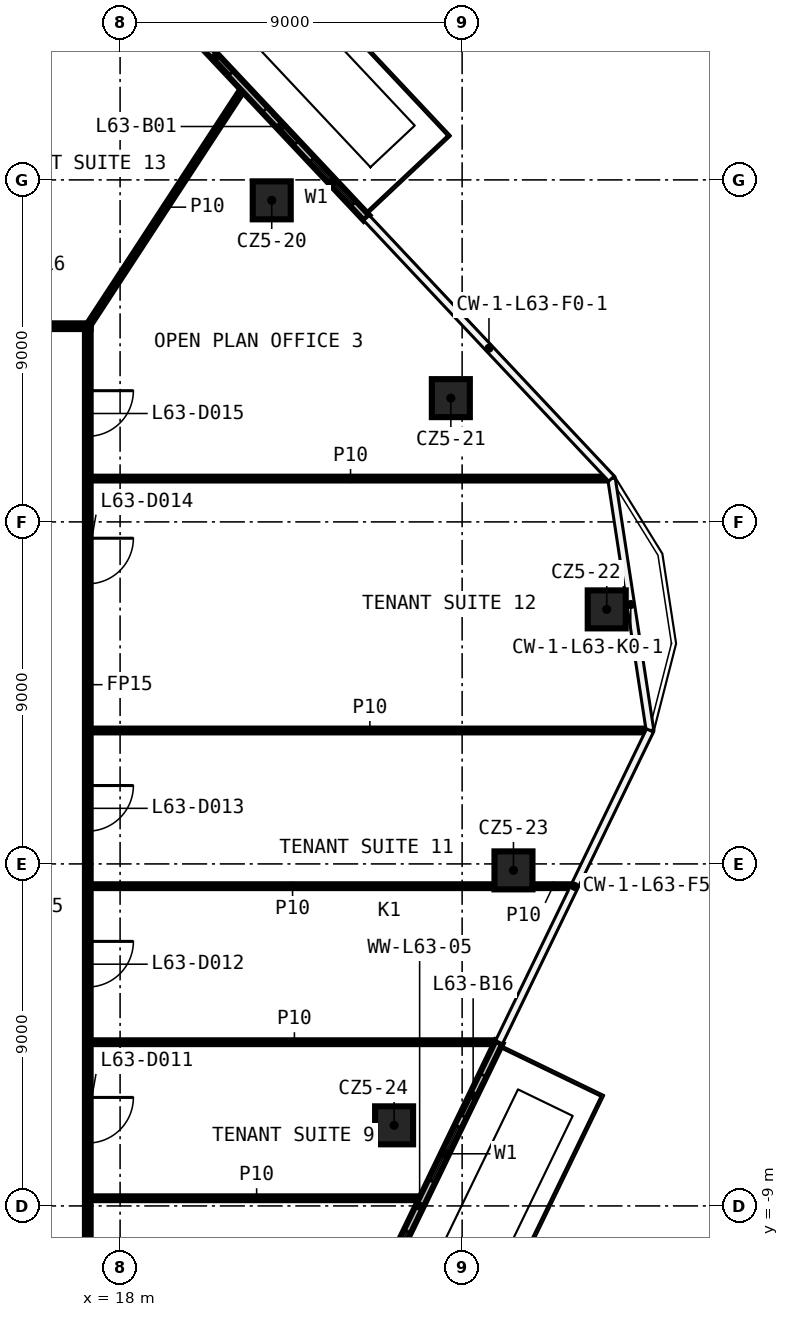
"""IFC4 building model, lengths in metres.
Left out: names, types, materials, properties, quantities, classifications, styles, units other than length and angle.
Written with IfcOpenShell. Run it as: python <this file> out.ifc"""

import sys

from ifc_helpers import new_model, si_unit, direction, frame, frame_2d, origin, origin_2d, place, context, subcontext, project, spatial, rectangle, extrude, element, fill, save


model = new_model("IFC4")
c1 = context("Model", 3, precision=1e-05, world=origin(), true_north=direction((0.0, 1.0)))
c2 = subcontext(c1, "Body", "Model", "MODEL_VIEW")
j1 = project(units=[si_unit("LENGTHUNIT", "METRE"), si_unit("PLANEANGLEUNIT", "RADIAN")], contexts=[c1])
p1 = place(None, origin())
s1 = spatial("IfcSite", under=j1, at=p1, CompositionType="ELEMENT")
p2 = place(p1, origin())
s2 = spatial("IfcBuilding", under=s1, at=p2, CompositionType="ELEMENT")
p3 = place(p2, frame((0.0, 0.0, 298.4)))
s3 = spatial("IfcBuildingStorey", under=s2, at=p3, CompositionType="ELEMENT", Elevation=298.4)
for number, where, z_axis, x_axis in (
    (1, (21.99, 17.462, 0.0), (0.0, 0.0, 1.0), (1.0, 0.0, 0.0)),
    (2, (26.703, 12.257, 0.0), (0.0, 0.0, 1.0), (1.0, 0.0, 0.0)),
    (3, (30.805, 6.698, 0.0), (0.0, 0.0, 1.0), (1.0, 0.0, 0.0)),
    (4, (28.351, -0.17, 0.0), (0.0, 0.0, 1.0), (1.0, 0.0, 0.0)),
    (5, (25.21, -6.879, 0.0), (0.0, 0.0, 1.0), (1.0, 0.0, 0.0)),
):
    element("IfcColumn", number, at=place(p3, frame(where, z_axis=z_axis, x_axis=x_axis)), inside=s3, PredefinedType="COLUMN", context=c2, shape_type="SweptSolid", body=[
        extrude(rectangle(XDim=1.0, YDim=1.0, at=origin_2d()), origin(), (0.0, 0.0, 1.0), 3.82),
    ])
p4 = place(p3, frame((17.225, -8.798, 0.0), z_axis=(0.0, 0.0, 1.0), x_axis=(1.0, 0.0, 0.0)))
e6 = element("IfcWall", 6, at=p4, inside=s3, PredefinedType="PARTITIONING", context=c2, shape_type="SweptSolid", body=[
    extrude(rectangle(XDim=8.735, YDim=0.1, at=frame_2d((4.368, 0.0))), origin(), (0.0, 0.0, 1.0), 3.82),
])
p5 = place(p3, frame((17.225, -4.692, 0.0), z_axis=(0.0, 0.0, 1.0), x_axis=(1.0, 0.0, 0.0)))
e7 = element("IfcWall", 7, at=p5, inside=s3, PredefinedType="PARTITIONING", context=c2, shape_type="SweptSolid", body=[
    extrude(rectangle(XDim=10.723, YDim=0.1, at=frame_2d((5.362, 0.0))), origin(), (0.0, 0.0, 1.0), 3.82),
])
p6 = place(p3, frame((17.225, -0.586, 0.0), z_axis=(0.0, 0.0, 1.0), x_axis=(1.0, 0.0, 0.0)))
e8 = element("IfcWall", 8, at=p6, inside=s3, PredefinedType="PARTITIONING", context=c2, shape_type="SweptSolid", body=[
    extrude(rectangle(XDim=10.626, YDim=0.1, at=frame_2d((5.313, 0.0))), origin(), (0.0, 0.0, 1.0), 3.82),
])
p7 = place(p3, frame((28.851, -0.586, 0.0), z_axis=(0.0, 0.0, 1.0), x_axis=(1.0, 0.0, 0.0)))
e9 = element("IfcWall", 9, at=p7, inside=s3, PredefinedType="PARTITIONING", context=c2, shape_type="SweptSolid", body=[
    extrude(rectangle(XDim=1.086, YDim=0.1, at=frame_2d((0.543, 0.0))), origin(), (0.0, 0.0, 1.0), 3.82),
])
p8 = place(p3, frame((17.225, 3.511, 0.0), z_axis=(0.0, 0.0, 1.0), x_axis=(1.0, 0.0, 0.0)))
e10 = element("IfcWall", 10, at=p8, inside=s3, PredefinedType="PARTITIONING", context=c2, shape_type="SweptSolid", body=[
    extrude(rectangle(XDim=14.696, YDim=0.1, at=frame_2d((7.348, 0.0))), origin(), (0.0, 0.0, 1.0), 3.82),
])
p9 = place(p3, frame((17.225, 10.14, 0.0), z_axis=(0.0, 0.0, 1.0), x_axis=(1.0, 0.0, 0.0)))
e11 = element("IfcWall", 11, at=p9, inside=s3, PredefinedType="PARTITIONING", context=c2, shape_type="SweptSolid", body=[
    extrude(rectangle(XDim=13.677, YDim=0.1, at=frame_2d((6.839, 0.0))), origin(), (0.0, 0.0, 1.0), 3.82),
])
p10 = place(p3, frame((-17.225, 14.15, 0.0), z_axis=(0.0, 0.0, 1.0), x_axis=(1.0, 0.0, 0.0)))
e12 = element("IfcWall", 12, at=p10, inside=s3, PredefinedType="PARTITIONING", context=c2, shape_type="SweptSolid", body=[
    extrude(rectangle(XDim=34.45, YDim=0.15, at=frame_2d((17.225, 0.0))), origin(), (0.0, 0.0, 1.0), 3.82),
])
p11 = place(p10, frame((31.962, 0.0, 0.0)))
e13 = element("IfcOpeningElement", 13, at=p11, cuts=e12, PredefinedType="OPENING", context=c2, shape_type="SweptSolid", body=[
    extrude(rectangle(XDim=1.2, YDim=2.1, at=frame_2d((0.6, 1.05))), frame((0.0, 0.085, 0.0), z_axis=(0.0, -1.0, 0.0), x_axis=(1.0, 0.0, 0.0)), (0.0, 0.0, 1.0), 0.17),
])
p12 = place(p10, frame((26.254, 0.0, 0.0)))
e14 = element("IfcOpeningElement", 14, at=p12, cuts=e12, PredefinedType="OPENING", context=c2, shape_type="SweptSolid", body=[
    extrude(rectangle(XDim=1.2, YDim=2.1, at=frame_2d((0.6, 1.05))), frame((0.0, 0.085, 0.0), z_axis=(0.0, -1.0, 0.0), x_axis=(1.0, 0.0, 0.0)), (0.0, 0.0, 1.0), 0.17),
])
p13 = place(p10, frame((20.032, 0.0, 0.0)))
e15 = element("IfcOpeningElement", 15, at=p13, cuts=e12, PredefinedType="OPENING", context=c2, shape_type="SweptSolid", body=[
    extrude(rectangle(XDim=1.2, YDim=2.1, at=frame_2d((0.6, 1.05))), frame((0.0, 0.085, 0.0), z_axis=(0.0, -1.0, 0.0), x_axis=(1.0, 0.0, 0.0)), (0.0, 0.0, 1.0), 0.17),
])
p14 = place(p10, frame((15.378, 0.0, 0.0)))
e16 = element("IfcOpeningElement", 16, at=p14, cuts=e12, PredefinedType="OPENING", context=c2, shape_type="SweptSolid", body=[
    extrude(rectangle(XDim=1.2, YDim=2.1, at=frame_2d((0.6, 1.05))), frame((0.0, 0.085, 0.0), z_axis=(0.0, -1.0, 0.0), x_axis=(1.0, 0.0, 0.0)), (0.0, 0.0, 1.0), 0.17),
])
p15 = place(p10, frame((10.723, 0.0, 0.0)))
e17 = element("IfcOpeningElement", 17, at=p15, cuts=e12, PredefinedType="OPENING", context=c2, shape_type="SweptSolid", body=[
    extrude(rectangle(XDim=1.2, YDim=2.1, at=frame_2d((0.6, 1.05))), frame((0.0, 0.085, 0.0), z_axis=(0.0, -1.0, 0.0), x_axis=(1.0, 0.0, 0.0)), (0.0, 0.0, 1.0), 0.17),
])
p16 = place(p10, frame((6.073, 0.0, 0.0)))
e18 = element("IfcOpeningElement", 18, at=p16, cuts=e12, PredefinedType="OPENING", context=c2, shape_type="SweptSolid", body=[
    extrude(rectangle(XDim=1.2, YDim=2.1, at=frame_2d((0.6, 1.05))), frame((0.0, 0.085, 0.0), z_axis=(0.0, -1.0, 0.0), x_axis=(1.0, 0.0, 0.0)), (0.0, 0.0, 1.0), 0.17),
])
p17 = place(p10, frame((1.774, 0.0, 0.0)))
e19 = element("IfcOpeningElement", 19, at=p17, cuts=e12, PredefinedType="OPENING", context=c2, shape_type="SweptSolid", body=[
    extrude(rectangle(XDim=1.2, YDim=2.1, at=frame_2d((0.6, 1.05))), frame((0.0, 0.085, 0.0), z_axis=(0.0, -1.0, 0.0), x_axis=(1.0, 0.0, 0.0)), (0.0, 0.0, 1.0), 0.17),
])
p18 = place(p3, frame((17.15, 14.15, 0.0), z_axis=(0.0, 0.0, 1.0), x_axis=(0.547120172247, 0.837054070608, 0.0)))
e20 = element("IfcWall", 20, at=p18, inside=s3, PredefinedType="PARTITIONING", context=c2, shape_type="SweptSolid", body=[
    extrude(rectangle(XDim=7.485, YDim=0.1, at=frame_2d((3.743, 0.0))), origin(), (0.0, 0.0, 1.0), 3.82),
])
p19 = place(p3, frame((17.15, 14.075, 0.0), z_axis=(0.0, 0.0, 1.0), x_axis=(0.0, -1.0, 0.0)))
e21 = element("IfcWall", 21, at=p19, inside=s3, PredefinedType="PARTITIONING", context=c2, shape_type="SweptSolid", body=[
    extrude(rectangle(XDim=28.15, YDim=0.15, at=frame_2d((14.075, 0.0))), origin(), (0.0, 0.0, 1.0), 3.82),
])
p20 = place(p19, frame((24.326, 0.0, 0.0)))
e22 = element("IfcOpeningElement", 22, at=p20, cuts=e21, PredefinedType="OPENING", context=c2, shape_type="SweptSolid", body=[
    extrude(rectangle(XDim=1.2, YDim=2.1, at=frame_2d((0.6, 1.05))), frame((0.0, 0.085, 0.0), z_axis=(0.0, -1.0, 0.0), x_axis=(1.0, 0.0, 0.0)), (0.0, 0.0, 1.0), 0.17),
])
p21 = place(p19, frame((20.22, 0.0, 0.0)))
e23 = element("IfcOpeningElement", 23, at=p21, cuts=e21, PredefinedType="OPENING", context=c2, shape_type="SweptSolid", body=[
    extrude(rectangle(XDim=1.2, YDim=2.1, at=frame_2d((0.6, 1.05))), frame((0.0, 0.085, 0.0), z_axis=(0.0, -1.0, 0.0), x_axis=(1.0, 0.0, 0.0)), (0.0, 0.0, 1.0), 0.17),
])
p22 = place(p19, frame((16.114, 0.0, 0.0)))
e24 = element("IfcOpeningElement", 24, at=p22, cuts=e21, PredefinedType="OPENING", context=c2, shape_type="SweptSolid", body=[
    extrude(rectangle(XDim=1.2, YDim=2.1, at=frame_2d((0.6, 1.05))), frame((0.0, 0.085, 0.0), z_axis=(0.0, -1.0, 0.0), x_axis=(1.0, 0.0, 0.0)), (0.0, 0.0, 1.0), 0.17),
])
p23 = place(p19, frame((12.012, 0.0, 0.0)))
e25 = element("IfcOpeningElement", 25, at=p23, cuts=e21, PredefinedType="OPENING", context=c2, shape_type="SweptSolid", body=[
    extrude(rectangle(XDim=1.2, YDim=2.1, at=frame_2d((0.6, 1.05))), frame((0.0, 0.085, 0.0), z_axis=(0.0, -1.0, 0.0), x_axis=(1.0, 0.0, 0.0)), (0.0, 0.0, 1.0), 0.17),
])
p24 = place(p19, frame((5.504, 0.0, 0.0)))
e26 = element("IfcOpeningElement", 26, at=p24, cuts=e21, PredefinedType="OPENING", context=c2, shape_type="SweptSolid", body=[
    extrude(rectangle(XDim=1.2, YDim=2.1, at=frame_2d((0.6, 1.05))), frame((0.0, 0.085, 0.0), z_axis=(0.0, -1.0, 0.0), x_axis=(1.0, 0.0, 0.0)), (0.0, 0.0, 1.0), 0.17),
])
p25 = place(p19, frame((1.622, 0.0, 0.0)))
e27 = element("IfcOpeningElement", 27, at=p25, cuts=e21, PredefinedType="OPENING", context=c2, shape_type="SweptSolid", body=[
    extrude(rectangle(XDim=1.2, YDim=2.1, at=frame_2d((0.6, 1.05))), frame((0.0, 0.085, 0.0), z_axis=(0.0, -1.0, 0.0), x_axis=(1.0, 0.0, 0.0)), (0.0, 0.0, 1.0), 0.17),
])
p26 = place(p3, frame((24.482, 17.0, 0.0), z_axis=(0.0, 0.0, 1.0), x_axis=(-0.684823965592, 0.728708539919, 0.0)))
e28 = element("IfcWall", 28, at=p26, inside=s3, PredefinedType="SOLIDWALL", context=c2, shape_type="SweptSolid", body=[
    extrude(rectangle(XDim=14.131, YDim=0.2, at=frame_2d((7.065, 0.0))), origin(), (0.0, 0.0, 1.0), 3.82),
])
p27 = place(p26, frame((0.5, 0.0, 0.6)))
e29 = element("IfcOpeningElement", 29, at=p27, cuts=e28, PredefinedType="OPENING", context=c2, shape_type="SweptSolid", body=[
    extrude(rectangle(XDim=1.6, YDim=2.4, at=frame_2d((0.8, 1.2))), frame((0.0, 0.11, 0.0), z_axis=(0.0, -1.0, 0.0), x_axis=(1.0, 0.0, 0.0)), (0.0, 0.0, 1.0), 0.22),
])
p28 = place(p26, frame((2.7, 0.0, 0.0)))
e30 = element("IfcOpeningElement", 30, at=p28, cuts=e28, PredefinedType="OPENING", context=c2, shape_type="SweptSolid", body=[
    extrude(rectangle(XDim=1.2, YDim=2.4, at=frame_2d((0.6, 1.2))), frame((0.0, 0.11, 0.0), z_axis=(0.0, -1.0, 0.0), x_axis=(1.0, 0.0, 0.0)), (0.0, 0.0, 1.0), 0.22),
])
p29 = place(p26, frame((6.71, 0.0, 0.6)))
e31 = element("IfcOpeningElement", 31, at=p29, cuts=e28, PredefinedType="OPENING", context=c2, shape_type="SweptSolid", body=[
    extrude(rectangle(XDim=1.6, YDim=2.4, at=frame_2d((0.8, 1.2))), frame((0.0, 0.11, 0.0), z_axis=(0.0, -1.0, 0.0), x_axis=(1.0, 0.0, 0.0)), (0.0, 0.0, 1.0), 0.22),
])
p30 = place(p26, frame((5.21, 0.0, 0.0)))
e32 = element("IfcOpeningElement", 32, at=p30, cuts=e28, PredefinedType="OPENING", context=c2, shape_type="SweptSolid", body=[
    extrude(rectangle(XDim=1.2, YDim=2.4, at=frame_2d((0.6, 1.2))), frame((0.0, 0.11, 0.0), z_axis=(0.0, -1.0, 0.0), x_axis=(1.0, 0.0, 0.0)), (0.0, 0.0, 1.0), 0.22),
])
p31 = place(p26, frame((11.42, 0.0, 0.6)))
e33 = element("IfcOpeningElement", 33, at=p31, cuts=e28, PredefinedType="OPENING", context=c2, shape_type="SweptSolid", body=[
    extrude(rectangle(XDim=1.6, YDim=2.4, at=frame_2d((0.8, 1.2))), frame((0.0, 0.11, 0.0), z_axis=(0.0, -1.0, 0.0), x_axis=(1.0, 0.0, 0.0)), (0.0, 0.0, 1.0), 0.22),
])
p32 = place(p26, frame((9.92, 0.0, 0.0)))
e34 = element("IfcOpeningElement", 34, at=p32, cuts=e28, PredefinedType="OPENING", context=c2, shape_type="SweptSolid", body=[
    extrude(rectangle(XDim=1.2, YDim=2.4, at=frame_2d((0.6, 1.2))), frame((0.0, 0.11, 0.0), z_axis=(0.0, -1.0, 0.0), x_axis=(1.0, 0.0, 0.0)), (0.0, 0.0, 1.0), 0.22),
])
p33 = place(p3, frame((20.017, -21.116, 0.0), z_axis=(0.0, 0.0, 1.0), x_axis=(0.435859541182, 0.90001470008, 0.0)))
e35 = element("IfcWall", 35, at=p33, inside=s3, PredefinedType="SOLIDWALL", context=c2, shape_type="SweptSolid", body=[
    extrude(rectangle(XDim=18.249, YDim=0.2, at=frame_2d((9.125, 0.0))), origin(), (0.0, 0.0, 1.0), 3.82),
])
p34 = place(p33, frame((2.6, 0.0, 0.6)))
e36 = element("IfcOpeningElement", 36, at=p34, cuts=e35, PredefinedType="OPENING", context=c2, shape_type="SweptSolid", body=[
    extrude(rectangle(XDim=1.6, YDim=2.4, at=frame_2d((0.8, 1.2))), frame((0.0, 0.11, 0.0), z_axis=(0.0, -1.0, 0.0), x_axis=(1.0, 0.0, 0.0)), (0.0, 0.0, 1.0), 0.22),
])
p35 = place(p33, frame((1.1, 0.0, 0.0)))
e37 = element("IfcOpeningElement", 37, at=p35, cuts=e35, PredefinedType="OPENING", context=c2, shape_type="SweptSolid", body=[
    extrude(rectangle(XDim=1.2, YDim=2.4, at=frame_2d((0.6, 1.2))), frame((0.0, 0.11, 0.0), z_axis=(0.0, -1.0, 0.0), x_axis=(1.0, 0.0, 0.0)), (0.0, 0.0, 1.0), 0.22),
])
p36 = place(p33, frame((6.562, 0.0, 0.6)))
e38 = element("IfcOpeningElement", 38, at=p36, cuts=e35, PredefinedType="OPENING", context=c2, shape_type="SweptSolid", body=[
    extrude(rectangle(XDim=1.6, YDim=2.4, at=frame_2d((0.8, 1.2))), frame((0.0, 0.11, 0.0), z_axis=(0.0, -1.0, 0.0), x_axis=(1.0, 0.0, 0.0)), (0.0, 0.0, 1.0), 0.22),
])
p37 = place(p33, frame((5.062, 0.0, 0.0)))
e39 = element("IfcOpeningElement", 39, at=p37, cuts=e35, PredefinedType="OPENING", context=c2, shape_type="SweptSolid", body=[
    extrude(rectangle(XDim=1.2, YDim=2.4, at=frame_2d((0.6, 1.2))), frame((0.0, 0.11, 0.0), z_axis=(0.0, -1.0, 0.0), x_axis=(1.0, 0.0, 0.0)), (0.0, 0.0, 1.0), 0.22),
])
p38 = place(p33, frame((11.125, 0.0, 0.6)))
e40 = element("IfcOpeningElement", 40, at=p38, cuts=e35, PredefinedType="OPENING", context=c2, shape_type="SweptSolid", body=[
    extrude(rectangle(XDim=1.6, YDim=2.4, at=frame_2d((0.8, 1.2))), frame((0.0, 0.11, 0.0), z_axis=(0.0, -1.0, 0.0), x_axis=(1.0, 0.0, 0.0)), (0.0, 0.0, 1.0), 0.22),
])
p39 = place(p33, frame((9.625, 0.0, 0.0)))
e41 = element("IfcOpeningElement", 41, at=p39, cuts=e35, PredefinedType="OPENING", context=c2, shape_type="SweptSolid", body=[
    extrude(rectangle(XDim=1.2, YDim=2.4, at=frame_2d((0.6, 1.2))), frame((0.0, 0.11, 0.0), z_axis=(0.0, -1.0, 0.0), x_axis=(1.0, 0.0, 0.0)), (0.0, 0.0, 1.0), 0.22),
])
p40 = place(p33, frame((14.187, 0.0, 0.6)))
e42 = element("IfcOpeningElement", 42, at=p40, cuts=e35, PredefinedType="OPENING", context=c2, shape_type="SweptSolid", body=[
    extrude(rectangle(XDim=1.6, YDim=2.4, at=frame_2d((0.8, 1.2))), frame((0.0, 0.11, 0.0), z_axis=(0.0, -1.0, 0.0), x_axis=(1.0, 0.0, 0.0)), (0.0, 0.0, 1.0), 0.22),
])
p41 = place(p33, frame((16.087, 0.0, 0.0)))
e43 = element("IfcOpeningElement", 43, at=p41, cuts=e35, PredefinedType="OPENING", context=c2, shape_type="SweptSolid", body=[
    extrude(rectangle(XDim=1.2, YDim=2.4, at=frame_2d((0.6, 1.2))), frame((0.0, 0.11, 0.0), z_axis=(0.0, -1.0, 0.0), x_axis=(1.0, 0.0, 0.0)), (0.0, 0.0, 1.0), 0.22),
])
p42 = place(p21, origin())
e44 = element("IfcDoor", 44, at=p42, inside=s3, OperationType="SINGLE_SWING_RIGHT", PredefinedType="DOOR", context=c2, shape_type="SweptSolid", body=[
    extrude(rectangle(XDim=1.2, YDim=2.1, at=frame_2d((0.6, 1.05))), frame((0.0, 0.025, 0.0), z_axis=(0.0, -1.0, 0.0), x_axis=(1.0, 0.0, 0.0)), (0.0, 0.0, 1.0), 0.05),
])
fill(e23, e44)
p43 = place(p22, origin())
e45 = element("IfcDoor", 45, at=p43, inside=s3, OperationType="SINGLE_SWING_LEFT", PredefinedType="DOOR", context=c2, shape_type="SweptSolid", body=[
    extrude(rectangle(XDim=1.2, YDim=2.1, at=frame_2d((0.6, 1.05))), frame((0.0, 0.025, 0.0), z_axis=(0.0, -1.0, 0.0), x_axis=(1.0, 0.0, 0.0)), (0.0, 0.0, 1.0), 0.05),
])
fill(e24, e45)
p44 = place(p23, origin())
e46 = element("IfcDoor", 46, at=p44, inside=s3, OperationType="SINGLE_SWING_RIGHT", PredefinedType="DOOR", context=c2, shape_type="SweptSolid", body=[
    extrude(rectangle(XDim=1.2, YDim=2.1, at=frame_2d((0.6, 1.05))), frame((0.0, 0.025, 0.0), z_axis=(0.0, -1.0, 0.0), x_axis=(1.0, 0.0, 0.0)), (0.0, 0.0, 1.0), 0.05),
])
fill(e25, e46)
p45 = place(p24, origin())
e47 = element("IfcDoor", 47, at=p45, inside=s3, OperationType="SINGLE_SWING_LEFT", PredefinedType="DOOR", context=c2, shape_type="SweptSolid", body=[
    extrude(rectangle(XDim=1.2, YDim=2.1, at=frame_2d((0.6, 1.05))), frame((0.0, 0.025, 0.0), z_axis=(0.0, -1.0, 0.0), x_axis=(1.0, 0.0, 0.0)), (0.0, 0.0, 1.0), 0.05),
])
fill(e26, e47)
p46 = place(p25, origin())
e48 = element("IfcDoor", 48, at=p46, inside=s3, OperationType="SINGLE_SWING_RIGHT", PredefinedType="DOOR", context=c2, shape_type="SweptSolid", body=[
    extrude(rectangle(XDim=1.2, YDim=2.1, at=frame_2d((0.6, 1.05))), frame((0.0, 0.025, 0.0), z_axis=(0.0, -1.0, 0.0), x_axis=(1.0, 0.0, 0.0)), (0.0, 0.0, 1.0), 0.05),
])
fill(e27, e48)
p47 = place(p27, origin())
e49 = element("IfcWindow", 49, at=p47, inside=s3, PartitioningType="SINGLE_PANEL", PredefinedType="WINDOW", context=c2, shape_type="SweptSolid", body=[
    extrude(rectangle(XDim=1.6, YDim=2.4, at=frame_2d((0.8, 1.2))), frame((0.0, 0.03, 0.0), z_axis=(0.0, -1.0, 0.0), x_axis=(1.0, 0.0, 0.0)), (0.0, 0.0, 1.0), 0.06),
])
fill(e29, e49)
p48 = place(p28, origin())
e50 = element("IfcDoor", 50, at=p48, inside=s3, OperationType="SLIDING_TO_LEFT", PredefinedType="DOOR", context=c2, shape_type="SweptSolid", body=[
    extrude(rectangle(XDim=1.2, YDim=2.4, at=frame_2d((0.6, 1.2))), frame((0.0, 0.025, 0.0), z_axis=(0.0, -1.0, 0.0), x_axis=(1.0, 0.0, 0.0)), (0.0, 0.0, 1.0), 0.05),
])
fill(e30, e50)
p49 = place(p30, origin())
e51 = element("IfcDoor", 51, at=p49, inside=s3, OperationType="SLIDING_TO_LEFT", PredefinedType="DOOR", context=c2, shape_type="SweptSolid", body=[
    extrude(rectangle(XDim=1.2, YDim=2.4, at=frame_2d((0.6, 1.2))), frame((0.0, 0.025, 0.0), z_axis=(0.0, -1.0, 0.0), x_axis=(1.0, 0.0, 0.0)), (0.0, 0.0, 1.0), 0.05),
])
fill(e32, e51)
p50 = place(p38, origin())
e52 = element("IfcWindow", 52, at=p50, inside=s3, PartitioningType="SINGLE_PANEL", PredefinedType="WINDOW", context=c2, shape_type="SweptSolid", body=[
    extrude(rectangle(XDim=1.6, YDim=2.4, at=frame_2d((0.8, 1.2))), frame((0.0, 0.03, 0.0), z_axis=(0.0, -1.0, 0.0), x_axis=(1.0, 0.0, 0.0)), (0.0, 0.0, 1.0), 0.06),
])
fill(e40, e52)
p51 = place(p40, origin())
e53 = element("IfcWindow", 53, at=p51, inside=s3, PartitioningType="SINGLE_PANEL", PredefinedType="WINDOW", context=c2, shape_type="SweptSolid", body=[
    extrude(rectangle(XDim=1.6, YDim=2.4, at=frame_2d((0.8, 1.2))), frame((0.0, 0.03, 0.0), z_axis=(0.0, -1.0, 0.0), x_axis=(1.0, 0.0, 0.0)), (0.0, 0.0, 1.0), 0.06),
])
fill(e42, e53)
p52 = place(p41, origin())
e54 = element("IfcDoor", 54, at=p52, inside=s3, OperationType="SLIDING_TO_LEFT", PredefinedType="DOOR", context=c2, shape_type="SweptSolid", body=[
    extrude(rectangle(XDim=1.2, YDim=2.4, at=frame_2d((0.6, 1.2))), frame((0.0, 0.025, 0.0), z_axis=(0.0, -1.0, 0.0), x_axis=(1.0, 0.0, 0.0)), (0.0, 0.0, 1.0), 0.05),
])
fill(e43, e54)
save(model, sys.argv[1])
